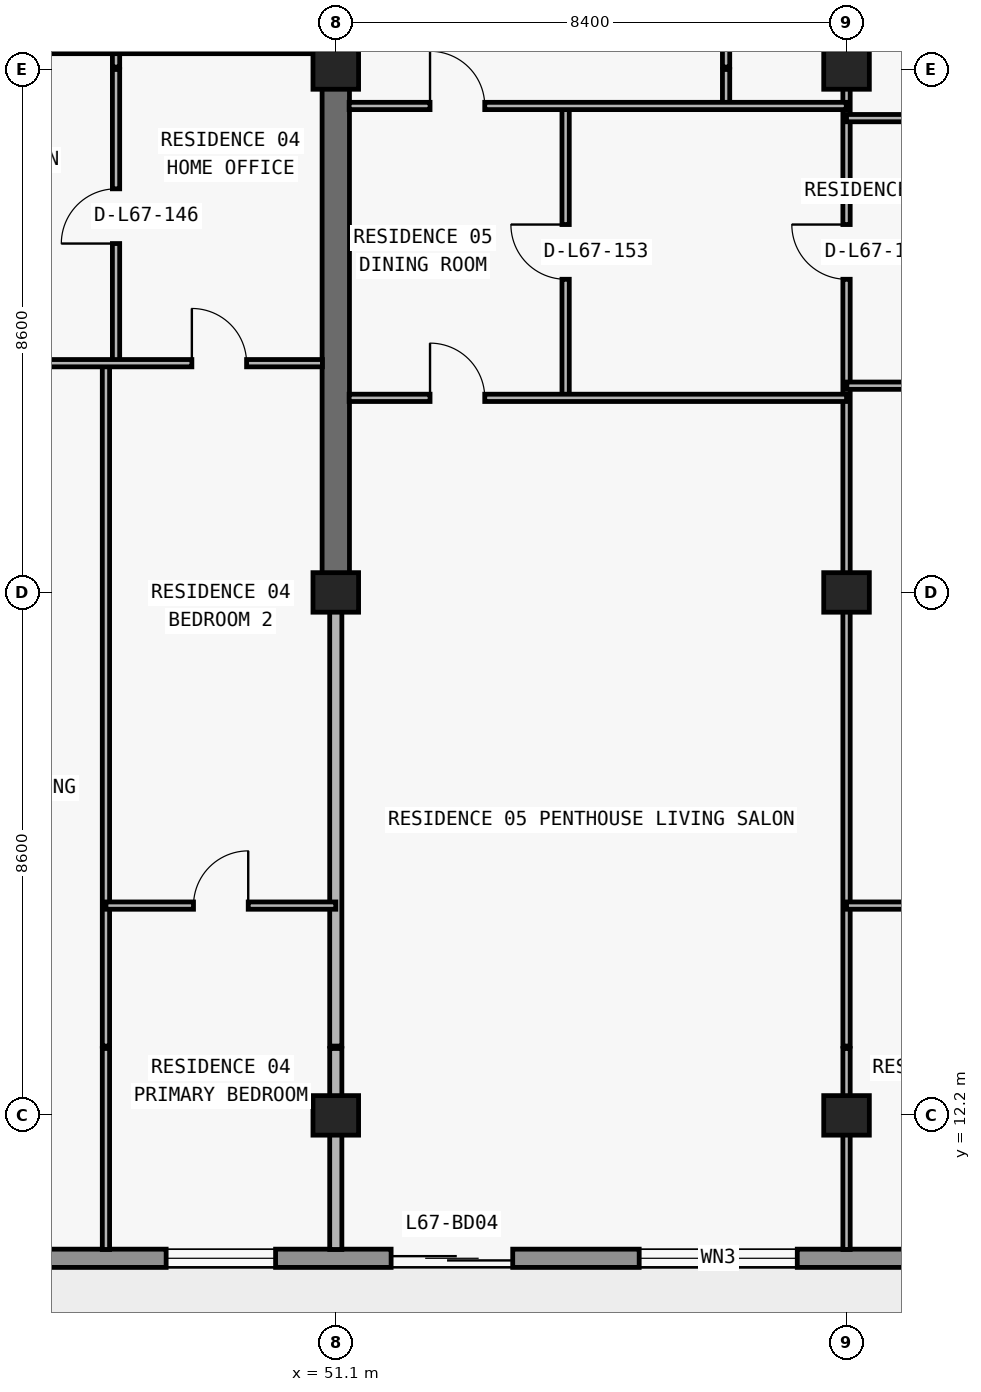
"""IFC4 building model, lengths in metres.
Left out: names, types, materials, properties, quantities, classifications, styles, units other than length and angle.
Written with IfcOpenShell. Run it as: python <this file> out.ifc"""

import sys

from ifc_helpers import new_model, si_unit, direction, frame, frame_2d, origin, origin_2d, place, context, subcontext, project, spatial, rectangle, extrude, element, fill, save


model = new_model("IFC4")
c1 = context("Model", 3, precision=1e-05, world=origin(), true_north=direction((0.0, 1.0)))
c2 = subcontext(c1, "Body", "Model", "MODEL_VIEW")
j1 = project(units=[si_unit("LENGTHUNIT", "METRE"), si_unit("PLANEANGLEUNIT", "RADIAN")], contexts=[c1])
p1 = place(None, origin())
s1 = spatial("IfcSite", under=j1, at=p1, CompositionType="ELEMENT")
p2 = place(p1, origin())
s2 = spatial("IfcBuilding", under=s1, at=p2, CompositionType="ELEMENT")
p3 = place(p2, frame((0.0, 0.0, 239.7)))
s3 = spatial("IfcBuildingStorey", under=s2, at=p3, CompositionType="ELEMENT", Elevation=239.7)
for number, where, z_axis, x_axis in (
    (1, (51.1, 12.2, 0.0), (0.0, 0.0, 1.0), (1.0, 0.0, 0.0)),
    (2, (59.5, 12.2, 0.0), (0.0, 0.0, 1.0), (1.0, 0.0, 0.0)),
    (3, (51.1, 20.8, 0.0), (0.0, 0.0, 1.0), (1.0, 0.0, 0.0)),
    (4, (59.5, 20.8, 0.0), (0.0, 0.0, 1.0), (1.0, 0.0, 0.0)),
    (5, (51.1, 29.4, 0.0), (0.0, 0.0, 1.0), (1.0, 0.0, 0.0)),
    (6, (59.5, 29.4, 0.0), (0.0, 0.0, 1.0), (1.0, 0.0, 0.0)),
):
    element("IfcColumn", number, at=place(p3, frame(where, z_axis=z_axis, x_axis=x_axis)), inside=s3, PredefinedType="COLUMN", context=c2, shape_type="SweptSolid", body=[
        extrude(rectangle(XDim=0.75, YDim=0.65, at=origin_2d()), origin(), (0.0, 0.0, 1.0), 3.05),
    ])
p4 = place(p3, frame((51.1, 20.8, 0.0), z_axis=(0.0, 0.0, 1.0), x_axis=(0.0, 1.0, 0.0)))
e7 = element("IfcWall", 7, at=p4, inside=s3, PredefinedType="SHEAR", context=c2, shape_type="SweptSolid", body=[
    extrude(rectangle(XDim=8.6, YDim=0.45, at=frame_2d((4.3, 0.0))), origin(), (0.0, 0.0, 1.0), 3.05),
])
p5 = place(p3, frame((65.7, 9.85, 0.0), z_axis=(0.0, 0.0, 1.0), x_axis=(-1.0, 0.0, 0.0)))
e8 = element("IfcWall", 8, at=p5, inside=s3, PredefinedType="STANDARD", context=c2, shape_type="SweptSolid", body=[
    extrude(rectangle(XDim=53.6, YDim=0.3, at=frame_2d((26.8, 0.0))), origin(), (0.0, 0.0, 1.0), 3.05),
])
p6 = place(p5, frame((49.5, 0.0, 0.0)))
e9 = element("IfcOpeningElement", 9, at=p6, cuts=e8, PredefinedType="OPENING", context=c2, shape_type="SweptSolid", body=[
    extrude(rectangle(XDim=2.0, YDim=2.3, at=frame_2d((1.0, 1.15))), frame((0.0, 0.16, 0.0), z_axis=(0.0, -1.0, 0.0), x_axis=(1.0, 0.0, 0.0)), (0.0, 0.0, 1.0), 0.32),
])
p7 = place(p5, frame((42.1, 0.0, 0.85)))
e10 = element("IfcOpeningElement", 10, at=p7, cuts=e8, PredefinedType="OPENING", context=c2, shape_type="SweptSolid", body=[
    extrude(rectangle(XDim=2.2, YDim=1.55, at=frame_2d((1.1, 0.775))), frame((0.0, 0.16, 0.0), z_axis=(0.0, -1.0, 0.0), x_axis=(1.0, 0.0, 0.0)), (0.0, 0.0, 1.0), 0.32),
])
p8 = place(p5, frame((35.69, 0.0, 0.0)))
e11 = element("IfcOpeningElement", 11, at=p8, cuts=e8, PredefinedType="OPENING", context=c2, shape_type="SweptSolid", body=[
    extrude(rectangle(XDim=2.0, YDim=2.3, at=frame_2d((1.0, 1.15))), frame((0.0, 0.16, 0.0), z_axis=(0.0, -1.0, 0.0), x_axis=(1.0, 0.0, 0.0)), (0.0, 0.0, 1.0), 0.32),
])
p9 = place(p5, frame((31.59, 0.0, 0.85)))
e12 = element("IfcOpeningElement", 12, at=p9, cuts=e8, PredefinedType="OPENING", context=c2, shape_type="SweptSolid", body=[
    extrude(rectangle(XDim=1.8, YDim=1.55, at=frame_2d((0.9, 0.775))), frame((0.0, 0.16, 0.0), z_axis=(0.0, -1.0, 0.0), x_axis=(1.0, 0.0, 0.0)), (0.0, 0.0, 1.0), 0.32),
])
p10 = place(p5, frame((23.914, 0.0, 0.85)))
e13 = element("IfcOpeningElement", 13, at=p10, cuts=e8, PredefinedType="OPENING", context=c2, shape_type="SweptSolid", body=[
    extrude(rectangle(XDim=2.2, YDim=1.55, at=frame_2d((1.1, 0.775))), frame((0.0, 0.16, 0.0), z_axis=(0.0, -1.0, 0.0), x_axis=(1.0, 0.0, 0.0)), (0.0, 0.0, 1.0), 0.32),
])
p11 = place(p5, frame((19.69, 0.0, 0.0)))
e14 = element("IfcOpeningElement", 14, at=p11, cuts=e8, PredefinedType="OPENING", context=c2, shape_type="SweptSolid", body=[
    extrude(rectangle(XDim=2.0, YDim=2.3, at=frame_2d((1.0, 1.15))), frame((0.0, 0.16, 0.0), z_axis=(0.0, -1.0, 0.0), x_axis=(1.0, 0.0, 0.0)), (0.0, 0.0, 1.0), 0.32),
])
p12 = place(p5, frame((15.59, 0.0, 0.85)))
e15 = element("IfcOpeningElement", 15, at=p12, cuts=e8, PredefinedType="OPENING", context=c2, shape_type="SweptSolid", body=[
    extrude(rectangle(XDim=1.8, YDim=1.55, at=frame_2d((0.9, 0.775))), frame((0.0, 0.16, 0.0), z_axis=(0.0, -1.0, 0.0), x_axis=(1.0, 0.0, 0.0)), (0.0, 0.0, 1.0), 0.32),
])
p13 = place(p5, frame((11.69, 0.0, 0.0)))
e16 = element("IfcOpeningElement", 16, at=p13, cuts=e8, PredefinedType="OPENING", context=c2, shape_type="SweptSolid", body=[
    extrude(rectangle(XDim=2.0, YDim=2.3, at=frame_2d((1.0, 1.15))), frame((0.0, 0.16, 0.0), z_axis=(0.0, -1.0, 0.0), x_axis=(1.0, 0.0, 0.0)), (0.0, 0.0, 1.0), 0.32),
])
p14 = place(p5, frame((7.01, 0.0, 0.65)))
e17 = element("IfcOpeningElement", 17, at=p14, cuts=e8, PredefinedType="OPENING", context=c2, shape_type="SweptSolid", body=[
    extrude(rectangle(XDim=2.6, YDim=1.85, at=frame_2d((1.3, 0.925))), frame((0.0, 0.16, 0.0), z_axis=(0.0, -1.0, 0.0), x_axis=(1.0, 0.0, 0.0)), (0.0, 0.0, 1.0), 0.32),
])
p15 = place(p5, frame((2.0, 0.0, 0.85)))
e18 = element("IfcOpeningElement", 18, at=p15, cuts=e8, PredefinedType="OPENING", context=c2, shape_type="SweptSolid", body=[
    extrude(rectangle(XDim=2.2, YDim=1.55, at=frame_2d((1.1, 0.775))), frame((0.0, 0.16, 0.0), z_axis=(0.0, -1.0, 0.0), x_axis=(1.0, 0.0, 0.0)), (0.0, 0.0, 1.0), 0.32),
])
p16 = place(p3, frame((47.32, 9.995, 0.0), z_axis=(0.0, 0.0, 1.0), x_axis=(0.0, 1.0, 0.0)))
e19 = element("IfcWall", 19, at=p16, inside=s3, PredefinedType="PARTITIONING", context=c2, shape_type="SweptSolid", body=[
    extrude(rectangle(XDim=3.305, YDim=0.12, at=frame_2d((1.652, 0.0))), origin(), (0.0, 0.0, 1.0), 3.05),
])
p17 = place(p3, frame((47.32, 13.34, 0.0), z_axis=(0.0, 0.0, 1.0), x_axis=(0.0, 1.0, 0.0)))
e20 = element("IfcWall", 20, at=p17, inside=s3, PredefinedType="PARTITIONING", context=c2, shape_type="SweptSolid", body=[
    extrude(rectangle(XDim=11.23, YDim=0.12, at=frame_2d((5.615, 0.0))), origin(), (0.0, 0.0, 1.0), 3.05),
])
p18 = place(p3, frame((47.486, 24.575, 0.0), z_axis=(0.0, 0.0, 1.0), x_axis=(0.0, 1.0, 0.0)))
e21 = element("IfcWall", 21, at=p18, inside=s3, PredefinedType="PARTITIONING", context=c2, shape_type="SweptSolid", body=[
    extrude(rectangle(XDim=4.825, YDim=0.12, at=frame_2d((2.413, 0.0))), origin(), (0.0, 0.0, 1.0), 3.05),
])
p19 = place(p18, frame((1.962, 0.0, 0.0)))
e22 = element("IfcOpeningElement", 22, at=p19, cuts=e21, PredefinedType="OPENING", context=c2, shape_type="SweptSolid", body=[
    extrude(rectangle(XDim=0.9, YDim=2.15, at=frame_2d((0.45, 1.075))), frame((0.0, 0.07, 0.0), z_axis=(0.0, -1.0, 0.0), x_axis=(1.0, 0.0, 0.0)), (0.0, 0.0, 1.0), 0.14),
])
p20 = place(p3, frame((47.486, 29.44, 0.0), z_axis=(0.0, 0.0, 1.0), x_axis=(0.0, 1.0, 0.0)))
e23 = element("IfcWall", 23, at=p20, inside=s3, PredefinedType="PARTITIONING", context=c2, shape_type="SweptSolid", body=[
    extrude(rectangle(XDim=0.28, YDim=0.12, at=frame_2d((0.14, 0.0))), origin(), (0.0, 0.0, 1.0), 3.05),
])
p21 = place(p3, frame((51.1, 9.995, 0.0), z_axis=(0.0, 0.0, 1.0), x_axis=(0.0, 1.0, 0.0)))
e24 = element("IfcWall", 24, at=p21, inside=s3, PredefinedType="PARTITIONING", context=c2, shape_type="SweptSolid", body=[
    extrude(rectangle(XDim=3.305, YDim=0.2, at=frame_2d((1.652, 0.0))), origin(), (0.0, 0.0, 1.0), 2.263),
])
p22 = place(p3, frame((51.1, 13.34, 0.0), z_axis=(0.0, 0.0, 1.0), x_axis=(0.0, 1.0, 0.0)))
e25 = element("IfcWall", 25, at=p22, inside=s3, PredefinedType="PARTITIONING", context=c2, shape_type="SweptSolid", body=[
    extrude(rectangle(XDim=7.455, YDim=0.2, at=frame_2d((3.728, 0.0))), origin(), (0.0, 0.0, 1.0), 2.263),
])
p23 = place(p3, frame((51.1, 29.44, 0.0), z_axis=(0.0, 0.0, 1.0), x_axis=(0.0, 1.0, 0.0)))
e26 = element("IfcWall", 26, at=p23, inside=s3, PredefinedType="PARTITIONING", context=c2, shape_type="SweptSolid", body=[
    extrude(rectangle(XDim=4.56, YDim=0.2, at=frame_2d((2.28, 0.0))), origin(), (0.0, 0.0, 1.0), 2.335),
])
p24 = place(p3, frame((54.88, 24.0, 0.0), z_axis=(0.0, 0.0, 1.0), x_axis=(0.0, 1.0, 0.0)))
e27 = element("IfcWall", 27, at=p24, inside=s3, PredefinedType="PARTITIONING", context=c2, shape_type="SweptSolid", body=[
    extrude(rectangle(XDim=4.8, YDim=0.12, at=frame_2d((2.4, 0.0))), origin(), (0.0, 0.0, 1.0), 3.05),
])
p25 = place(p24, frame((1.95, 0.0, 0.0)))
e28 = element("IfcOpeningElement", 28, at=p25, cuts=e27, PredefinedType="OPENING", context=c2, shape_type="SweptSolid", body=[
    extrude(rectangle(XDim=0.9, YDim=2.15, at=frame_2d((0.45, 1.075))), frame((0.0, 0.07, 0.0), z_axis=(0.0, -1.0, 0.0), x_axis=(1.0, 0.0, 0.0)), (0.0, 0.0, 1.0), 0.14),
])
p26 = place(p3, frame((57.519, 28.8, 0.0), z_axis=(0.0, 0.0, 1.0), x_axis=(0.0, 1.0, 0.0)))
e29 = element("IfcWall", 29, at=p26, inside=s3, PredefinedType="PARTITIONING", context=c2, shape_type="SweptSolid", body=[
    extrude(rectangle(XDim=0.6, YDim=0.12, at=frame_2d((0.3, 0.0))), origin(), (0.0, 0.0, 1.0), 3.05),
])
p27 = place(p3, frame((57.519, 29.44, 0.0), z_axis=(0.0, 0.0, 1.0), x_axis=(0.0, 1.0, 0.0)))
e30 = element("IfcWall", 30, at=p27, inside=s3, PredefinedType="PARTITIONING", context=c2, shape_type="SweptSolid", body=[
    extrude(rectangle(XDim=4.56, YDim=0.12, at=frame_2d((2.28, 0.0))), origin(), (0.0, 0.0, 1.0), 3.05),
])
p28 = place(p27, frame((1.855, 0.0, 0.0)))
e31 = element("IfcOpeningElement", 31, at=p28, cuts=e30, PredefinedType="OPENING", context=c2, shape_type="SweptSolid", body=[
    extrude(rectangle(XDim=0.85, YDim=2.1, at=frame_2d((0.425, 1.05))), frame((0.0, 0.07, 0.0), z_axis=(0.0, -1.0, 0.0), x_axis=(1.0, 0.0, 0.0)), (0.0, 0.0, 1.0), 0.14),
])
p29 = place(p3, frame((59.5, 9.995, 0.0), z_axis=(0.0, 0.0, 1.0), x_axis=(0.0, 1.0, 0.0)))
e32 = element("IfcWall", 32, at=p29, inside=s3, PredefinedType="PARTITIONING", context=c2, shape_type="SweptSolid", body=[
    extrude(rectangle(XDim=3.305, YDim=0.12, at=frame_2d((1.652, 0.0))), origin(), (0.0, 0.0, 1.0), 2.263),
])
p30 = place(p3, frame((59.5, 13.34, 0.0), z_axis=(0.0, 0.0, 1.0), x_axis=(0.0, 1.0, 0.0)))
e33 = element("IfcWall", 33, at=p30, inside=s3, PredefinedType="PARTITIONING", context=c2, shape_type="SweptSolid", body=[
    extrude(rectangle(XDim=16.06, YDim=0.12, at=frame_2d((8.03, 0.0))), origin(), (0.0, 0.0, 1.0), 2.263),
])
p31 = place(p30, frame((12.61, 0.0, 0.0)))
e34 = element("IfcOpeningElement", 34, at=p31, cuts=e33, PredefinedType="OPENING", context=c2, shape_type="SweptSolid", body=[
    extrude(rectangle(XDim=0.9, YDim=2.15, at=frame_2d((0.45, 1.075))), frame((0.0, 0.07, 0.0), z_axis=(0.0, -1.0, 0.0), x_axis=(1.0, 0.0, 0.0)), (0.0, 0.0, 1.0), 0.14),
])
p32 = place(p3, frame((59.5, 29.44, 0.0), z_axis=(0.0, 0.0, 1.0), x_axis=(0.0, 1.0, 0.0)))
e35 = element("IfcWall", 35, at=p32, inside=s3, PredefinedType="PARTITIONING", context=c2, shape_type="SweptSolid", body=[
    extrude(rectangle(XDim=4.56, YDim=0.12, at=frame_2d((2.28, 0.0))), origin(), (0.0, 0.0, 1.0), 2.263),
])
p33 = place(p3, frame((47.32, 15.65, 0.0), z_axis=(0.0, 0.0, 1.0), x_axis=(1.0, 0.0, 0.0)))
e36 = element("IfcWall", 36, at=p33, inside=s3, PredefinedType="PARTITIONING", context=c2, shape_type="SweptSolid", body=[
    extrude(rectangle(XDim=3.78, YDim=0.12, at=frame_2d((1.89, 0.0))), origin(), (0.0, 0.0, 1.0), 3.05),
])
p34 = place(p33, frame((1.44, 0.0, 0.0)))
e37 = element("IfcOpeningElement", 37, at=p34, cuts=e36, PredefinedType="OPENING", context=c2, shape_type="SweptSolid", body=[
    extrude(rectangle(XDim=0.9, YDim=2.15, at=frame_2d((0.45, 1.075))), frame((0.0, 0.07, 0.0), z_axis=(0.0, -1.0, 0.0), x_axis=(1.0, 0.0, 0.0)), (0.0, 0.0, 1.0), 0.14),
])
p35 = place(p3, frame((59.5, 15.65, 0.0), z_axis=(0.0, 0.0, 1.0), x_axis=(1.0, 0.0, 0.0)))
e38 = element("IfcWall", 38, at=p35, inside=s3, PredefinedType="PARTITIONING", context=c2, shape_type="SweptSolid", body=[
    extrude(rectangle(XDim=6.2, YDim=0.12, at=frame_2d((3.1, 0.0))), origin(), (0.0, 0.0, 1.0), 3.05),
])
p36 = place(p35, frame((2.65, 0.0, 0.0)))
e39 = element("IfcOpeningElement", 39, at=p36, cuts=e38, PredefinedType="OPENING", context=c2, shape_type="SweptSolid", body=[
    extrude(rectangle(XDim=0.9, YDim=2.15, at=frame_2d((0.45, 1.075))), frame((0.0, 0.07, 0.0), z_axis=(0.0, -1.0, 0.0), x_axis=(1.0, 0.0, 0.0)), (0.0, 0.0, 1.0), 0.14),
])
p37 = place(p3, frame((51.32, 24.0, 0.0), z_axis=(0.0, 0.0, 1.0), x_axis=(1.0, 0.0, 0.0)))
e40 = element("IfcWall", 40, at=p37, inside=s3, PredefinedType="PARTITIONING", context=c2, shape_type="SweptSolid", body=[
    extrude(rectangle(XDim=8.18, YDim=0.12, at=frame_2d((4.09, 0.0))), origin(), (0.0, 0.0, 1.0), 3.05),
])
p38 = place(p37, frame((1.33, 0.0, 0.0)))
e41 = element("IfcOpeningElement", 41, at=p38, cuts=e40, PredefinedType="OPENING", context=c2, shape_type="SweptSolid", body=[
    extrude(rectangle(XDim=0.9, YDim=2.15, at=frame_2d((0.45, 1.075))), frame((0.0, 0.07, 0.0), z_axis=(0.0, -1.0, 0.0), x_axis=(1.0, 0.0, 0.0)), (0.0, 0.0, 1.0), 0.14),
])
p39 = place(p3, frame((59.505, 24.2, 0.0), z_axis=(0.0, 0.0, 1.0), x_axis=(1.0, 0.0, 0.0)))
e42 = element("IfcWall", 42, at=p39, inside=s3, PredefinedType="PARTITIONING", context=c2, shape_type="SweptSolid", body=[
    extrude(rectangle(XDim=6.195, YDim=0.12, at=frame_2d((3.098, 0.0))), origin(), (0.0, 0.0, 1.0), 3.05),
])
p40 = place(p39, frame((2.647, 0.0, 0.0)))
e43 = element("IfcOpeningElement", 43, at=p40, cuts=e42, PredefinedType="OPENING", context=c2, shape_type="SweptSolid", body=[
    extrude(rectangle(XDim=0.9, YDim=2.15, at=frame_2d((0.45, 1.075))), frame((0.0, 0.07, 0.0), z_axis=(0.0, -1.0, 0.0), x_axis=(1.0, 0.0, 0.0)), (0.0, 0.0, 1.0), 0.14),
])
p41 = place(p3, frame((42.7, 24.57, 0.0), z_axis=(0.0, 0.0, 1.0), x_axis=(1.0, 0.0, 0.0)))
e44 = element("IfcWall", 44, at=p41, inside=s3, PredefinedType="PARTITIONING", context=c2, shape_type="SweptSolid", body=[
    extrude(rectangle(XDim=8.18, YDim=0.12, at=frame_2d((4.09, 0.0))), origin(), (0.0, 0.0, 1.0), 3.05),
])
p42 = place(p41, frame((1.86, 0.0, 0.0)))
e45 = element("IfcOpeningElement", 45, at=p42, cuts=e44, PredefinedType="OPENING", context=c2, shape_type="SweptSolid", body=[
    extrude(rectangle(XDim=0.9, YDim=2.15, at=frame_2d((0.45, 1.075))), frame((0.0, 0.07, 0.0), z_axis=(0.0, -1.0, 0.0), x_axis=(1.0, 0.0, 0.0)), (0.0, 0.0, 1.0), 0.14),
])
p43 = place(p41, frame((6.033, 0.0, 0.0)))
e46 = element("IfcOpeningElement", 46, at=p43, cuts=e44, PredefinedType="OPENING", context=c2, shape_type="SweptSolid", body=[
    extrude(rectangle(XDim=0.9, YDim=2.15, at=frame_2d((0.45, 1.075))), frame((0.0, 0.07, 0.0), z_axis=(0.0, -1.0, 0.0), x_axis=(1.0, 0.0, 0.0)), (0.0, 0.0, 1.0), 0.14),
])
p44 = place(p3, frame((59.5, 28.6, 0.0), z_axis=(0.0, 0.0, 1.0), x_axis=(1.0, 0.0, 0.0)))
e47 = element("IfcWall", 47, at=p44, inside=s3, PredefinedType="PARTITIONING", context=c2, shape_type="SweptSolid", body=[
    extrude(rectangle(XDim=6.2, YDim=0.12, at=frame_2d((3.1, 0.0))), origin(), (0.0, 0.0, 1.0), 3.05),
])
p45 = place(p44, frame((1.761, 0.0, 0.0)))
e48 = element("IfcOpeningElement", 48, at=p45, cuts=e47, PredefinedType="OPENING", context=c2, shape_type="SweptSolid", body=[
    extrude(rectangle(XDim=0.9, YDim=2.15, at=frame_2d((0.45, 1.075))), frame((0.0, 0.07, 0.0), z_axis=(0.0, -1.0, 0.0), x_axis=(1.0, 0.0, 0.0)), (0.0, 0.0, 1.0), 0.14),
])
p46 = place(p3, frame((51.32, 28.8, 0.0), z_axis=(0.0, 0.0, 1.0), x_axis=(1.0, 0.0, 0.0)))
e49 = element("IfcWall", 49, at=p46, inside=s3, PredefinedType="PARTITIONING", context=c2, shape_type="SweptSolid", body=[
    extrude(rectangle(XDim=8.175, YDim=0.12, at=frame_2d((4.087, 0.0))), origin(), (0.0, 0.0, 1.0), 3.05),
])
p47 = place(p46, frame((1.33, 0.0, 0.0)))
e50 = element("IfcOpeningElement", 50, at=p47, cuts=e49, PredefinedType="OPENING", context=c2, shape_type="SweptSolid", body=[
    extrude(rectangle(XDim=0.9, YDim=2.15, at=frame_2d((0.45, 1.075))), frame((0.0, 0.07, 0.0), z_axis=(0.0, -1.0, 0.0), x_axis=(1.0, 0.0, 0.0)), (0.0, 0.0, 1.0), 0.14),
])
p48 = place(p3, frame((42.7, 29.72, 0.0), z_axis=(0.0, 0.0, 1.0), x_axis=(1.0, 0.0, 0.0)))
e51 = element("IfcWall", 51, at=p48, inside=s3, PredefinedType="PARTITIONING", context=c2, shape_type="SweptSolid", body=[
    extrude(rectangle(XDim=8.4, YDim=0.12, at=frame_2d((4.2, 0.0))), origin(), (0.0, 0.0, 1.0), 2.263),
])
p49 = place(p48, frame((1.943, 0.0, 0.0)))
e52 = element("IfcOpeningElement", 52, at=p49, cuts=e51, PredefinedType="OPENING", context=c2, shape_type="SweptSolid", body=[
    extrude(rectangle(XDim=0.9, YDim=2.15, at=frame_2d((0.45, 1.075))), frame((0.0, 0.07, 0.0), z_axis=(0.0, -1.0, 0.0), x_axis=(1.0, 0.0, 0.0)), (0.0, 0.0, 1.0), 0.14),
])
p50 = place(p12, origin())
e53 = element("IfcWindow", 53, at=p50, inside=s3, PartitioningType="SINGLE_PANEL", PredefinedType="WINDOW", context=c2, shape_type="SweptSolid", body=[
    extrude(rectangle(XDim=1.8, YDim=1.55, at=frame_2d((0.9, 0.775))), frame((0.0, 0.03, 0.0), z_axis=(0.0, -1.0, 0.0), x_axis=(1.0, 0.0, 0.0)), (0.0, 0.0, 1.0), 0.06),
])
fill(e15, e53)
p51 = place(p13, origin())
e54 = element("IfcDoor", 54, at=p51, inside=s3, OperationType="DOUBLE_DOOR_SLIDING", PredefinedType="DOOR", context=c2, shape_type="SweptSolid", body=[
    extrude(rectangle(XDim=2.0, YDim=2.3, at=frame_2d((1.0, 1.15))), frame((0.0, 0.025, 0.0), z_axis=(0.0, -1.0, 0.0), x_axis=(1.0, 0.0, 0.0)), (0.0, 0.0, 1.0), 0.05),
])
fill(e16, e54)
p52 = place(p14, origin())
e55 = element("IfcWindow", 55, at=p52, inside=s3, PartitioningType="SINGLE_PANEL", PredefinedType="WINDOW", context=c2, shape_type="SweptSolid", body=[
    extrude(rectangle(XDim=2.6, YDim=1.85, at=frame_2d((1.3, 0.925))), frame((0.0, 0.03, 0.0), z_axis=(0.0, -1.0, 0.0), x_axis=(1.0, 0.0, 0.0)), (0.0, 0.0, 1.0), 0.06),
])
fill(e17, e55)
p53 = place(p19, origin())
e56 = element("IfcDoor", 56, at=p53, inside=s3, OperationType="SINGLE_SWING_LEFT", PredefinedType="DOOR", context=c2, shape_type="SweptSolid", body=[
    extrude(rectangle(XDim=0.9, YDim=2.15, at=frame_2d((0.45, 1.075))), frame((0.0, 0.025, 0.0), z_axis=(0.0, -1.0, 0.0), x_axis=(1.0, 0.0, 0.0)), (0.0, 0.0, 1.0), 0.05),
])
fill(e22, e56)
p54 = place(p43, origin())
e57 = element("IfcDoor", 57, at=p54, inside=s3, OperationType="SINGLE_SWING_LEFT", PredefinedType="DOOR", context=c2, shape_type="SweptSolid", body=[
    extrude(rectangle(XDim=0.9, YDim=2.15, at=frame_2d((0.45, 1.075))), frame((0.0, 0.025, 0.0), z_axis=(0.0, -1.0, 0.0), x_axis=(1.0, 0.0, 0.0)), (0.0, 0.0, 1.0), 0.05),
])
fill(e46, e57)
p55 = place(p34, origin())
e58 = element("IfcDoor", 58, at=p55, inside=s3, OperationType="SINGLE_SWING_RIGHT", PredefinedType="DOOR", context=c2, shape_type="SweptSolid", body=[
    extrude(rectangle(XDim=0.9, YDim=2.15, at=frame_2d((0.45, 1.075))), frame((0.0, 0.025, 0.0), z_axis=(0.0, -1.0, 0.0), x_axis=(1.0, 0.0, 0.0)), (0.0, 0.0, 1.0), 0.05),
])
fill(e37, e58)
p56 = place(p47, origin())
e59 = element("IfcDoor", 59, at=p56, inside=s3, OperationType="SINGLE_SWING_LEFT", PredefinedType="DOOR", context=c2, shape_type="SweptSolid", body=[
    extrude(rectangle(XDim=0.9, YDim=2.15, at=frame_2d((0.45, 1.075))), frame((0.0, 0.025, 0.0), z_axis=(0.0, -1.0, 0.0), x_axis=(1.0, 0.0, 0.0)), (0.0, 0.0, 1.0), 0.05),
])
fill(e50, e59)
p57 = place(p25, origin())
e60 = element("IfcDoor", 60, at=p57, inside=s3, OperationType="SINGLE_SWING_RIGHT", PredefinedType="DOOR", context=c2, shape_type="SweptSolid", body=[
    extrude(rectangle(XDim=0.9, YDim=2.15, at=frame_2d((0.45, 1.075))), frame((0.0, 0.025, 0.0), z_axis=(0.0, -1.0, 0.0), x_axis=(1.0, 0.0, 0.0)), (0.0, 0.0, 1.0), 0.05),
])
fill(e28, e60)
p58 = place(p38, origin())
e61 = element("IfcDoor", 61, at=p58, inside=s3, OperationType="SINGLE_SWING_LEFT", PredefinedType="DOOR", context=c2, shape_type="SweptSolid", body=[
    extrude(rectangle(XDim=0.9, YDim=2.15, at=frame_2d((0.45, 1.075))), frame((0.0, 0.025, 0.0), z_axis=(0.0, -1.0, 0.0), x_axis=(1.0, 0.0, 0.0)), (0.0, 0.0, 1.0), 0.05),
])
fill(e41, e61)
p59 = place(p31, origin())
e62 = element("IfcDoor", 62, at=p59, inside=s3, OperationType="SINGLE_SWING_RIGHT", PredefinedType="DOOR", context=c2, shape_type="SweptSolid", body=[
    extrude(rectangle(XDim=0.9, YDim=2.15, at=frame_2d((0.45, 1.075))), frame((0.0, 0.025, 0.0), z_axis=(0.0, -1.0, 0.0), x_axis=(1.0, 0.0, 0.0)), (0.0, 0.0, 1.0), 0.05),
])
fill(e34, e62)
save(model, sys.argv[1])
